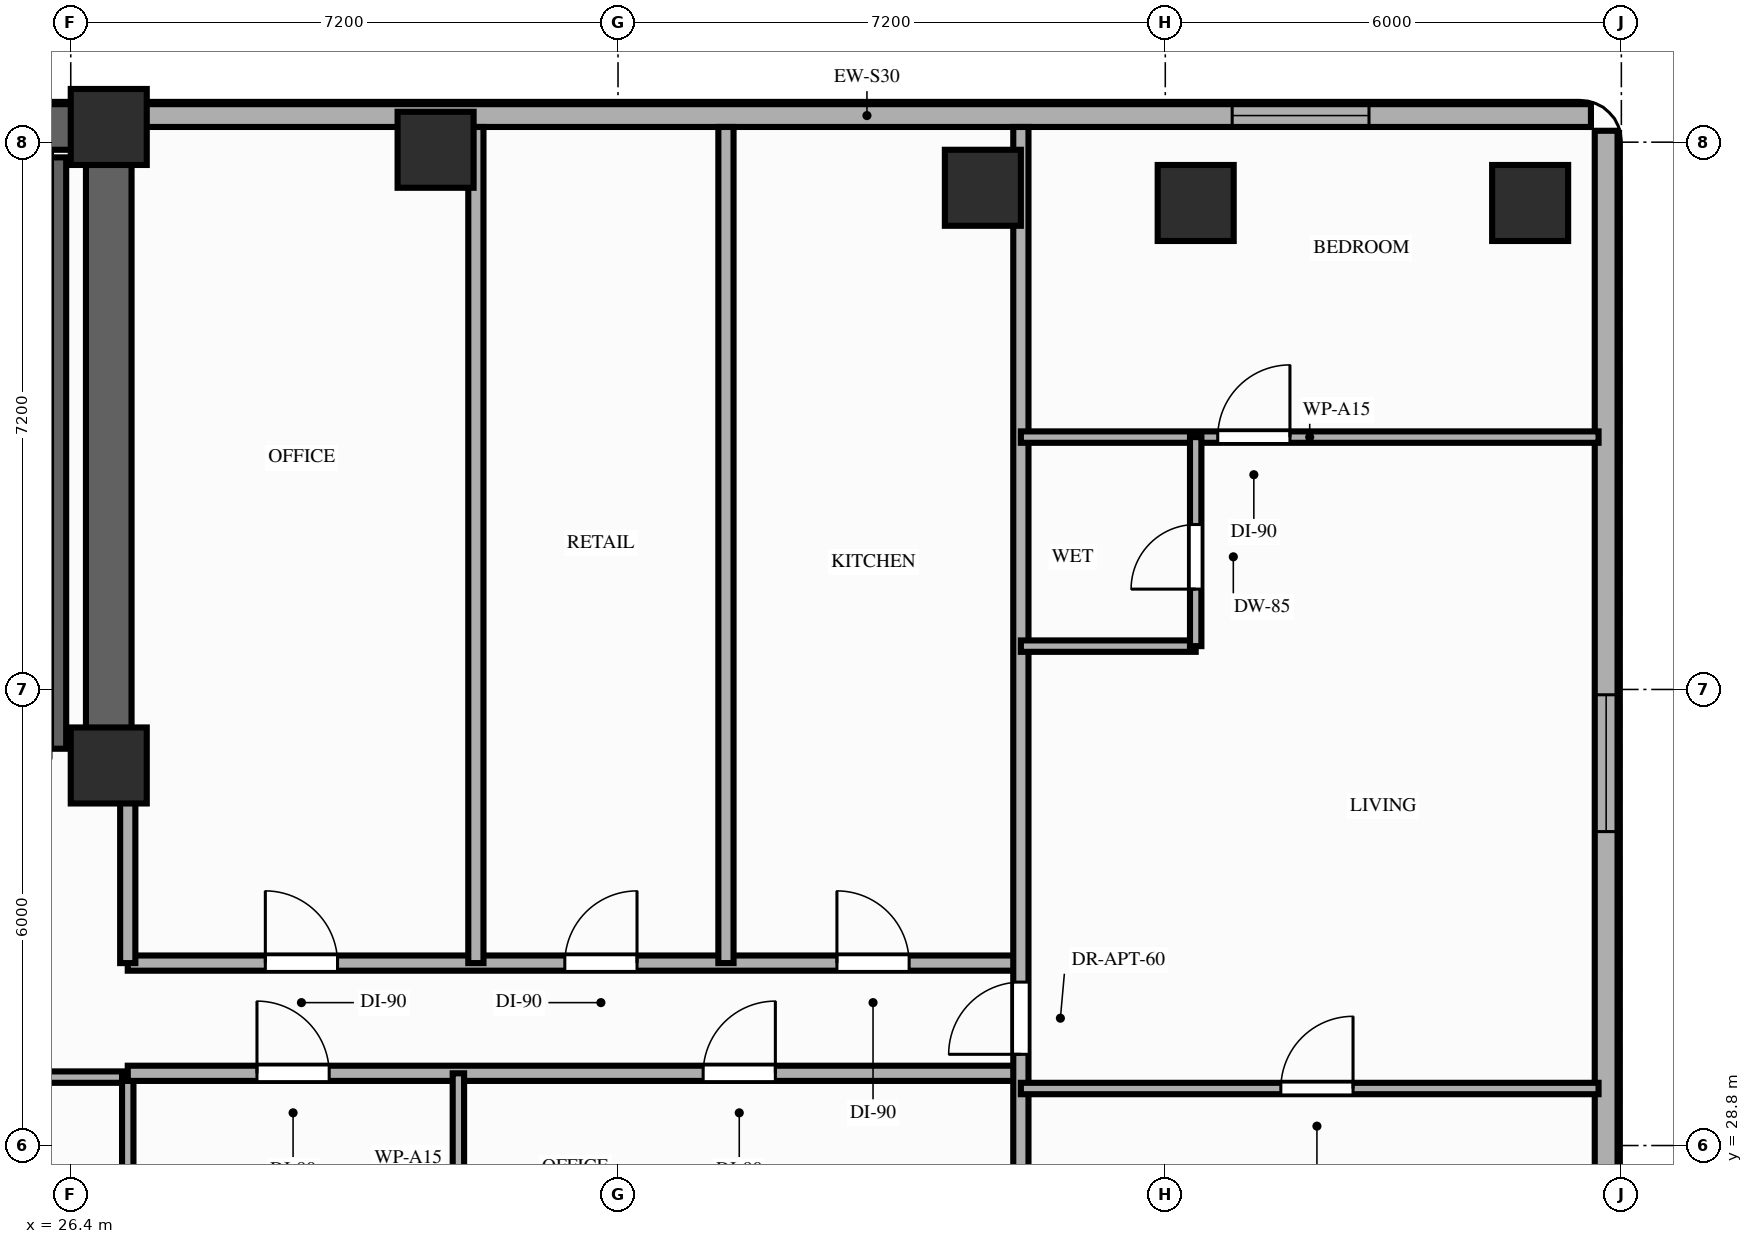
"""IFC4 building model, lengths in metres.
Left out: names, types, materials, properties, quantities, classifications, styles, units other than length and angle.
Written with IfcOpenShell. Run it as: python <this file> out.ifc"""

import sys

from ifc_helpers import new_model, si_unit, direction, frame, frame_2d, origin, origin_2d, place, context, subcontext, project, spatial, rectangle, extrude, element, fill, save


model = new_model("IFC4")
c1 = context("Model", 3, precision=1e-05, world=origin(), true_north=direction((0.0, 1.0)))
c2 = subcontext(c1, "Body", "Model", "MODEL_VIEW")
j1 = project(units=[si_unit("LENGTHUNIT", "METRE"), si_unit("PLANEANGLEUNIT", "RADIAN")], contexts=[c1])
p1 = place(None, origin())
s1 = spatial("IfcSite", under=j1, at=p1, CompositionType="ELEMENT")
p2 = place(p1, origin())
s2 = spatial("IfcBuilding", under=s1, at=p2, CompositionType="ELEMENT")
p3 = place(p2, frame((0.0, 0.0, 145.8)))
s3 = spatial("IfcBuildingStorey", under=s2, at=p3, CompositionType="ELEMENT", Elevation=145.8)
for number, where, z_axis, x_axis in (
    (1, (26.9, 33.8, 0.0), (0.0, 0.0, 1.0), (1.0, 0.0, 0.0)),
    (2, (26.9, 42.2, 0.0), (0.0, 0.0, 1.0), (1.0, 0.0, 0.0)),
    (3, (31.2, 41.9, 0.0), (0.0, 0.0, 1.0), (1.0, 0.0, 0.0)),
    (4, (38.4, 41.4, 0.0), (0.0, 0.0, 1.0), (1.0, 0.0, 0.0)),
    (5, (41.2, 41.2, 0.0), (0.0, 0.0, 1.0), (1.0, 0.0, 0.0)),
    (6, (45.6, 41.2, 0.0), (0.0, 0.0, 1.0), (1.0, 0.0, 0.0)),
):
    element("IfcColumn", number, at=place(p3, frame(where, z_axis=z_axis, x_axis=x_axis)), inside=s3, PredefinedType="COLUMN", context=c2, shape_type="SweptSolid", body=[
        extrude(rectangle(XDim=1.0, YDim=1.0, at=origin_2d()), origin(), (0.0, 0.0, 1.0), 3.2),
    ])
p4 = place(p3, frame((46.4, 42.35, 0.0), z_axis=(0.0, 0.0, 1.0), x_axis=(-1.0, 0.0, 0.0)))
e7 = element("IfcWall", 7, at=p4, inside=s3, PredefinedType="STANDARD", context=c2, shape_type="SweptSolid", body=[
    extrude(rectangle(XDim=19.05, YDim=0.3, at=frame_2d((9.525, 0.0))), origin(), (0.0, 0.0, 1.0), 2.45),
])
p5 = place(p4, frame((2.92, 0.0, 0.85)))
e8 = element("IfcOpeningElement", 8, at=p5, cuts=e7, PredefinedType="OPENING", context=c2, shape_type="SweptSolid", body=[
    extrude(rectangle(XDim=1.8, YDim=1.35, at=frame_2d((0.9, 0.675))), frame((0.0, 0.16, 0.0), z_axis=(0.0, -1.0, 0.0), x_axis=(1.0, 0.0, 0.0)), (0.0, 0.0, 1.0), 0.32),
])
p6 = place(p3, frame((46.6, 26.8, 0.0), z_axis=(0.0, 0.0, 1.0), x_axis=(0.0, 1.0, 0.0)))
e9 = element("IfcWall", 9, at=p6, inside=s3, PredefinedType="STANDARD", context=c2, shape_type="SweptSolid", body=[
    extrude(rectangle(XDim=15.35, YDim=0.3, at=frame_2d((7.675, 0.0))), origin(), (0.0, 0.0, 1.0), 3.02),
])
p7 = place(p6, frame((6.13, 0.0, 0.85)))
e10 = element("IfcOpeningElement", 10, at=p7, cuts=e9, PredefinedType="OPENING", context=c2, shape_type="SweptSolid", body=[
    extrude(rectangle(XDim=1.8, YDim=1.75, at=frame_2d((0.9, 0.875))), frame((0.0, 0.16, 0.0), z_axis=(0.0, -1.0, 0.0), x_axis=(1.0, 0.0, 0.0)), (0.0, 0.0, 1.0), 0.32),
])
p8 = place(p3, frame((6.45, 42.2, 0.0), z_axis=(0.0, 0.0, 1.0), x_axis=(1.0, 0.0, 0.0)))
e11 = element("IfcWall", 11, at=p8, inside=s3, PredefinedType="SHEAR", context=c2, shape_type="SweptSolid", body=[
    extrude(rectangle(XDim=20.45, YDim=0.6, at=frame_2d((10.225, 0.0))), origin(), (0.0, 0.0, 1.0), 3.02),
])
p9 = place(p3, frame((26.9, 33.8, 0.0), z_axis=(0.0, 0.0, 1.0), x_axis=(0.0, 1.0, 0.0)))
e12 = element("IfcWall", 12, at=p9, inside=s3, PredefinedType="SHEAR", context=c2, shape_type="SweptSolid", body=[
    extrude(rectangle(XDim=7.95, YDim=0.6, at=frame_2d((3.975, 0.0))), origin(), (0.0, 0.0, 1.0), 3.02),
])
p10 = place(p3, frame((26.24, 34.02, 0.0), z_axis=(0.0, 0.0, 1.0), x_axis=(0.0, 1.0, 0.0)))
e13 = element("IfcWall", 13, at=p10, inside=s3, PredefinedType="SHEAR", context=c2, shape_type="SweptSolid", body=[
    extrude(rectangle(XDim=7.78, YDim=0.2, at=frame_2d((3.89, 0.0))), origin(), (0.0, 0.0, 1.0), 3.02),
])
p11 = place(p3, frame((20.45, 29.7, 0.0), z_axis=(0.0, 0.0, 1.0), x_axis=(1.0, 0.0, 0.0)))
e14 = element("IfcWall", 14, at=p11, inside=s3, PredefinedType="PARTITIONING", context=c2, shape_type="SweptSolid", body=[
    extrude(rectangle(XDim=6.7, YDim=0.15, at=frame_2d((3.35, 0.0))), origin(), (0.0, 0.0, 1.0), 3.02),
])
p12 = place(p11, frame((2.8, 0.0, 0.0)))
e15 = element("IfcOpeningElement", 15, at=p12, cuts=e14, PredefinedType="OPENING", context=c2, shape_type="SweptSolid", body=[
    extrude(rectangle(XDim=0.95, YDim=2.15, at=frame_2d((0.475, 1.075))), frame((0.0, 0.085, 0.0), z_axis=(0.0, -1.0, 0.0), x_axis=(1.0, 0.0, 0.0)), (0.0, 0.0, 1.0), 0.17),
])
p13 = place(p3, frame((27.15, 26.75, 0.0), z_axis=(0.0, 0.0, 1.0), x_axis=(0.0, 1.0, 0.0)))
e16 = element("IfcWall", 16, at=p13, inside=s3, PredefinedType="PARTITIONING", context=c2, shape_type="SweptSolid", body=[
    extrude(rectangle(XDim=3.0, YDim=0.15, at=frame_2d((1.5, 0.0))), origin(), (0.0, 0.0, 1.0), 2.45),
])
p14 = place(p3, frame((27.15, 29.75, 0.0), z_axis=(0.0, 0.0, 1.0), x_axis=(1.0, 0.0, 0.0)))
e17 = element("IfcWall", 17, at=p14, inside=s3, PredefinedType="PARTITIONING", context=c2, shape_type="SweptSolid", body=[
    extrude(rectangle(XDim=11.75, YDim=0.2, at=frame_2d((5.875, 0.0))), origin(), (0.0, 0.0, 1.0), 2.45),
])
p15 = place(p14, frame((1.7, 0.0, 0.0)))
e18 = element("IfcOpeningElement", 18, at=p15, cuts=e17, PredefinedType="OPENING", context=c2, shape_type="SweptSolid", body=[
    extrude(rectangle(XDim=0.95, YDim=2.15, at=frame_2d((0.475, 1.075))), frame((0.0, 0.11, 0.0), z_axis=(0.0, -1.0, 0.0), x_axis=(1.0, 0.0, 0.0)), (0.0, 0.0, 1.0), 0.22),
])
p16 = place(p14, frame((7.57, 0.0, 0.0)))
e19 = element("IfcOpeningElement", 19, at=p16, cuts=e17, PredefinedType="OPENING", context=c2, shape_type="SweptSolid", body=[
    extrude(rectangle(XDim=0.95, YDim=2.15, at=frame_2d((0.475, 1.075))), frame((0.0, 0.11, 0.0), z_axis=(0.0, -1.0, 0.0), x_axis=(1.0, 0.0, 0.0)), (0.0, 0.0, 1.0), 0.22),
])
p17 = place(p3, frame((27.15, 31.2, 0.0), z_axis=(0.0, 0.0, 1.0), x_axis=(1.0, 0.0, 0.0)))
e20 = element("IfcWall", 20, at=p17, inside=s3, PredefinedType="PARTITIONING", context=c2, shape_type="SweptSolid", body=[
    extrude(rectangle(XDim=11.75, YDim=0.2, at=frame_2d((5.875, 0.0))), origin(), (0.0, 0.0, 1.0), 2.45),
])
p18 = place(p17, frame((1.81, 0.0, 0.0)))
e21 = element("IfcOpeningElement", 21, at=p18, cuts=e20, PredefinedType="OPENING", context=c2, shape_type="SweptSolid", body=[
    extrude(rectangle(XDim=0.95, YDim=2.15, at=frame_2d((0.475, 1.075))), frame((0.0, 0.11, 0.0), z_axis=(0.0, -1.0, 0.0), x_axis=(1.0, 0.0, 0.0)), (0.0, 0.0, 1.0), 0.22),
])
p19 = place(p17, frame((5.75, 0.0, 0.0)))
e22 = element("IfcOpeningElement", 22, at=p19, cuts=e20, PredefinedType="OPENING", context=c2, shape_type="SweptSolid", body=[
    extrude(rectangle(XDim=0.95, YDim=2.15, at=frame_2d((0.475, 1.075))), frame((0.0, 0.11, 0.0), z_axis=(0.0, -1.0, 0.0), x_axis=(1.0, 0.0, 0.0)), (0.0, 0.0, 1.0), 0.22),
])
p20 = place(p17, frame((9.33, 0.0, 0.0)))
e23 = element("IfcOpeningElement", 23, at=p20, cuts=e20, PredefinedType="OPENING", context=c2, shape_type="SweptSolid", body=[
    extrude(rectangle(XDim=0.95, YDim=2.15, at=frame_2d((0.475, 1.075))), frame((0.0, 0.11, 0.0), z_axis=(0.0, -1.0, 0.0), x_axis=(1.0, 0.0, 0.0)), (0.0, 0.0, 1.0), 0.22),
])
p21 = place(p3, frame((27.15, 31.2, 0.0), z_axis=(0.0, 0.0, 1.0), x_axis=(0.0, 1.0, 0.0)))
e24 = element("IfcWall", 24, at=p21, inside=s3, PredefinedType="PARTITIONING", context=c2, shape_type="SweptSolid", body=[
    extrude(rectangle(XDim=2.48, YDim=0.2, at=frame_2d((1.24, 0.0))), origin(), (0.0, 0.0, 1.0), 2.45),
])
p22 = place(p3, frame((38.9, 26.75, 0.0), z_axis=(0.0, 0.0, 1.0), x_axis=(0.0, 1.0, 0.0)))
e25 = element("IfcWall", 25, at=p22, inside=s3, PredefinedType="PARTITIONING", context=c2, shape_type="SweptSolid", body=[
    extrude(rectangle(XDim=15.45, YDim=0.2, at=frame_2d((7.725, 0.0))), origin(), (0.0, 0.0, 1.0), 2.45),
])
p23 = place(p22, frame((3.25, 0.0, 0.0)))
e26 = element("IfcOpeningElement", 26, at=p23, cuts=e25, PredefinedType="OPENING", context=c2, shape_type="SweptSolid", body=[
    extrude(rectangle(XDim=0.95, YDim=2.15, at=frame_2d((0.475, 1.075))), frame((0.0, 0.11, 0.0), z_axis=(0.0, -1.0, 0.0), x_axis=(1.0, 0.0, 0.0)), (0.0, 0.0, 1.0), 0.22),
])
p24 = place(p3, frame((38.9, 29.55, 0.0), z_axis=(0.0, 0.0, 1.0), x_axis=(1.0, 0.0, 0.0)))
e27 = element("IfcWall", 27, at=p24, inside=s3, PredefinedType="PARTITIONING", context=c2, shape_type="SweptSolid", body=[
    extrude(rectangle(XDim=7.6, YDim=0.15, at=frame_2d((3.8, 0.0))), origin(), (0.0, 0.0, 1.0), 2.45),
])
p25 = place(p24, frame((3.42, 0.0, 0.0)))
e28 = element("IfcOpeningElement", 28, at=p25, cuts=e27, PredefinedType="OPENING", context=c2, shape_type="SweptSolid", body=[
    extrude(rectangle(XDim=0.95, YDim=2.15, at=frame_2d((0.475, 1.075))), frame((0.0, 0.085, 0.0), z_axis=(0.0, -1.0, 0.0), x_axis=(1.0, 0.0, 0.0)), (0.0, 0.0, 1.0), 0.17),
])
p26 = place(p3, frame((38.9, 38.12, 0.0), z_axis=(0.0, 0.0, 1.0), x_axis=(1.0, 0.0, 0.0)))
e29 = element("IfcWall", 29, at=p26, inside=s3, PredefinedType="PARTITIONING", context=c2, shape_type="SweptSolid", body=[
    extrude(rectangle(XDim=7.6, YDim=0.15, at=frame_2d((3.8, 0.0))), origin(), (0.0, 0.0, 1.0), 2.45),
])
p27 = place(p26, frame((2.59, 0.0, 0.0)))
e30 = element("IfcOpeningElement", 30, at=p27, cuts=e29, PredefinedType="OPENING", context=c2, shape_type="SweptSolid", body=[
    extrude(rectangle(XDim=0.95, YDim=2.15, at=frame_2d((0.475, 1.075))), frame((0.0, 0.085, 0.0), z_axis=(0.0, -1.0, 0.0), x_axis=(1.0, 0.0, 0.0)), (0.0, 0.0, 1.0), 0.17),
])
p28 = place(p3, frame((38.9, 35.37, 0.0), z_axis=(0.0, 0.0, 1.0), x_axis=(1.0, 0.0, 0.0)))
e31 = element("IfcWall", 31, at=p28, inside=s3, PredefinedType="PARTITIONING", context=c2, shape_type="SweptSolid", body=[
    extrude(rectangle(XDim=2.3, YDim=0.15, at=frame_2d((1.15, 0.0))), origin(), (0.0, 0.0, 1.0), 2.45),
])
p29 = place(p3, frame((41.2, 35.37, 0.0), z_axis=(0.0, 0.0, 1.0), x_axis=(0.0, 1.0, 0.0)))
e32 = element("IfcWall", 32, at=p29, inside=s3, PredefinedType="PARTITIONING", context=c2, shape_type="SweptSolid", body=[
    extrude(rectangle(XDim=2.75, YDim=0.15, at=frame_2d((1.375, 0.0))), origin(), (0.0, 0.0, 1.0), 2.45),
])
p30 = place(p29, frame((0.75, 0.0, 0.0)))
e33 = element("IfcOpeningElement", 33, at=p30, cuts=e32, PredefinedType="OPENING", context=c2, shape_type="SweptSolid", body=[
    extrude(rectangle(XDim=0.85, YDim=2.1, at=frame_2d((0.425, 1.05))), frame((0.0, 0.085, 0.0), z_axis=(0.0, -1.0, 0.0), x_axis=(1.0, 0.0, 0.0)), (0.0, 0.0, 1.0), 0.17),
])
p31 = place(p3, frame((31.5, 26.75, 0.0), z_axis=(0.0, 0.0, 1.0), x_axis=(0.0, 1.0, 0.0)))
e34 = element("IfcWall", 34, at=p31, inside=s3, PredefinedType="PARTITIONING", context=c2, shape_type="SweptSolid", body=[
    extrude(rectangle(XDim=3.0, YDim=0.15, at=frame_2d((1.5, 0.0))), origin(), (0.0, 0.0, 1.0), 2.45),
])
for number, where, z_axis, x_axis in (
    (35, (31.73, 31.2, 0.0), (0.0, 0.0, 1.0), (0.0, 1.0, 0.0)),
    (36, (35.02, 31.2, 0.0), (0.0, 0.0, 1.0), (0.0, 1.0, 0.0)),
):
    element("IfcWall", number, at=place(p3, frame(where, z_axis=z_axis, x_axis=x_axis)), inside=s3, PredefinedType="PARTITIONING", context=c2, shape_type="SweptSolid", body=[
        extrude(rectangle(XDim=11.0, YDim=0.2, at=frame_2d((5.5, 0.0))), origin(), (0.0, 0.0, 1.0), 2.45),
    ])
p32 = place(p7, origin())
e37 = element("IfcWindow", 37, at=p32, inside=s3, PartitioningType="SINGLE_PANEL", PredefinedType="WINDOW", context=c2, shape_type="SweptSolid", body=[
    extrude(rectangle(XDim=1.8, YDim=1.75, at=frame_2d((0.9, 0.875))), frame((0.0, 0.03, 0.0), z_axis=(0.0, -1.0, 0.0), x_axis=(1.0, 0.0, 0.0)), (0.0, 0.0, 1.0), 0.06),
])
fill(e10, e37)
p33 = place(p5, origin())
e38 = element("IfcWindow", 38, at=p33, inside=s3, PartitioningType="SINGLE_PANEL", PredefinedType="WINDOW", context=c2, shape_type="SweptSolid", body=[
    extrude(rectangle(XDim=1.8, YDim=1.35, at=frame_2d((0.9, 0.675))), frame((0.0, 0.03, 0.0), z_axis=(0.0, -1.0, 0.0), x_axis=(1.0, 0.0, 0.0)), (0.0, 0.0, 1.0), 0.06),
])
fill(e8, e38)
p34 = place(p23, origin())
e39 = element("IfcDoor", 39, at=p34, inside=s3, OperationType="SINGLE_SWING_LEFT", PredefinedType="DOOR", context=c2, shape_type="SweptSolid", body=[
    extrude(rectangle(XDim=0.95, YDim=2.15, at=frame_2d((0.475, 1.075))), frame((0.0, 0.025, 0.0), z_axis=(0.0, -1.0, 0.0), x_axis=(1.0, 0.0, 0.0)), (0.0, 0.0, 1.0), 0.05),
])
fill(e26, e39)
p35 = place(p27, origin())
e40 = element("IfcDoor", 40, at=p35, inside=s3, OperationType="SINGLE_SWING_RIGHT", PredefinedType="DOOR", context=c2, shape_type="SweptSolid", body=[
    extrude(rectangle(XDim=0.95, YDim=2.15, at=frame_2d((0.475, 1.075))), frame((0.0, 0.025, 0.0), z_axis=(0.0, -1.0, 0.0), x_axis=(1.0, 0.0, 0.0)), (0.0, 0.0, 1.0), 0.05),
])
fill(e30, e40)
p36 = place(p30, origin())
e41 = element("IfcDoor", 41, at=p36, inside=s3, OperationType="SINGLE_SWING_LEFT", PredefinedType="DOOR", context=c2, shape_type="SweptSolid", body=[
    extrude(rectangle(XDim=0.85, YDim=2.1, at=frame_2d((0.425, 1.05))), frame((0.0, 0.025, 0.0), z_axis=(0.0, -1.0, 0.0), x_axis=(1.0, 0.0, 0.0)), (0.0, 0.0, 1.0), 0.05),
])
fill(e33, e41)
p37 = place(p25, origin())
e42 = element("IfcDoor", 42, at=p37, inside=s3, OperationType="SINGLE_SWING_RIGHT", PredefinedType="DOOR", context=c2, shape_type="SweptSolid", body=[
    extrude(rectangle(XDim=0.95, YDim=2.15, at=frame_2d((0.475, 1.075))), frame((0.0, 0.025, 0.0), z_axis=(0.0, -1.0, 0.0), x_axis=(1.0, 0.0, 0.0)), (0.0, 0.0, 1.0), 0.05),
])
fill(e28, e42)
p38 = place(p15, origin())
e43 = element("IfcDoor", 43, at=p38, inside=s3, OperationType="SINGLE_SWING_LEFT", PredefinedType="DOOR", context=c2, shape_type="SweptSolid", body=[
    extrude(rectangle(XDim=0.95, YDim=2.15, at=frame_2d((0.475, 1.075))), frame((0.0, 0.025, 0.0), z_axis=(0.0, -1.0, 0.0), x_axis=(1.0, 0.0, 0.0)), (0.0, 0.0, 1.0), 0.05),
])
fill(e18, e43)
p39 = place(p16, origin())
e44 = element("IfcDoor", 44, at=p39, inside=s3, OperationType="SINGLE_SWING_RIGHT", PredefinedType="DOOR", context=c2, shape_type="SweptSolid", body=[
    extrude(rectangle(XDim=0.95, YDim=2.15, at=frame_2d((0.475, 1.075))), frame((0.0, 0.025, 0.0), z_axis=(0.0, -1.0, 0.0), x_axis=(1.0, 0.0, 0.0)), (0.0, 0.0, 1.0), 0.05),
])
fill(e19, e44)
p40 = place(p18, origin())
e45 = element("IfcDoor", 45, at=p40, inside=s3, OperationType="SINGLE_SWING_LEFT", PredefinedType="DOOR", context=c2, shape_type="SweptSolid", body=[
    extrude(rectangle(XDim=0.95, YDim=2.15, at=frame_2d((0.475, 1.075))), frame((0.0, 0.025, 0.0), z_axis=(0.0, -1.0, 0.0), x_axis=(1.0, 0.0, 0.0)), (0.0, 0.0, 1.0), 0.05),
])
fill(e21, e45)
p41 = place(p19, origin())
e46 = element("IfcDoor", 46, at=p41, inside=s3, OperationType="SINGLE_SWING_RIGHT", PredefinedType="DOOR", context=c2, shape_type="SweptSolid", body=[
    extrude(rectangle(XDim=0.95, YDim=2.15, at=frame_2d((0.475, 1.075))), frame((0.0, 0.025, 0.0), z_axis=(0.0, -1.0, 0.0), x_axis=(1.0, 0.0, 0.0)), (0.0, 0.0, 1.0), 0.05),
])
fill(e22, e46)
p42 = place(p20, origin())
e47 = element("IfcDoor", 47, at=p42, inside=s3, OperationType="SINGLE_SWING_LEFT", PredefinedType="DOOR", context=c2, shape_type="SweptSolid", body=[
    extrude(rectangle(XDim=0.95, YDim=2.15, at=frame_2d((0.475, 1.075))), frame((0.0, 0.025, 0.0), z_axis=(0.0, -1.0, 0.0), x_axis=(1.0, 0.0, 0.0)), (0.0, 0.0, 1.0), 0.05),
])
fill(e23, e47)
save(model, sys.argv[1])
